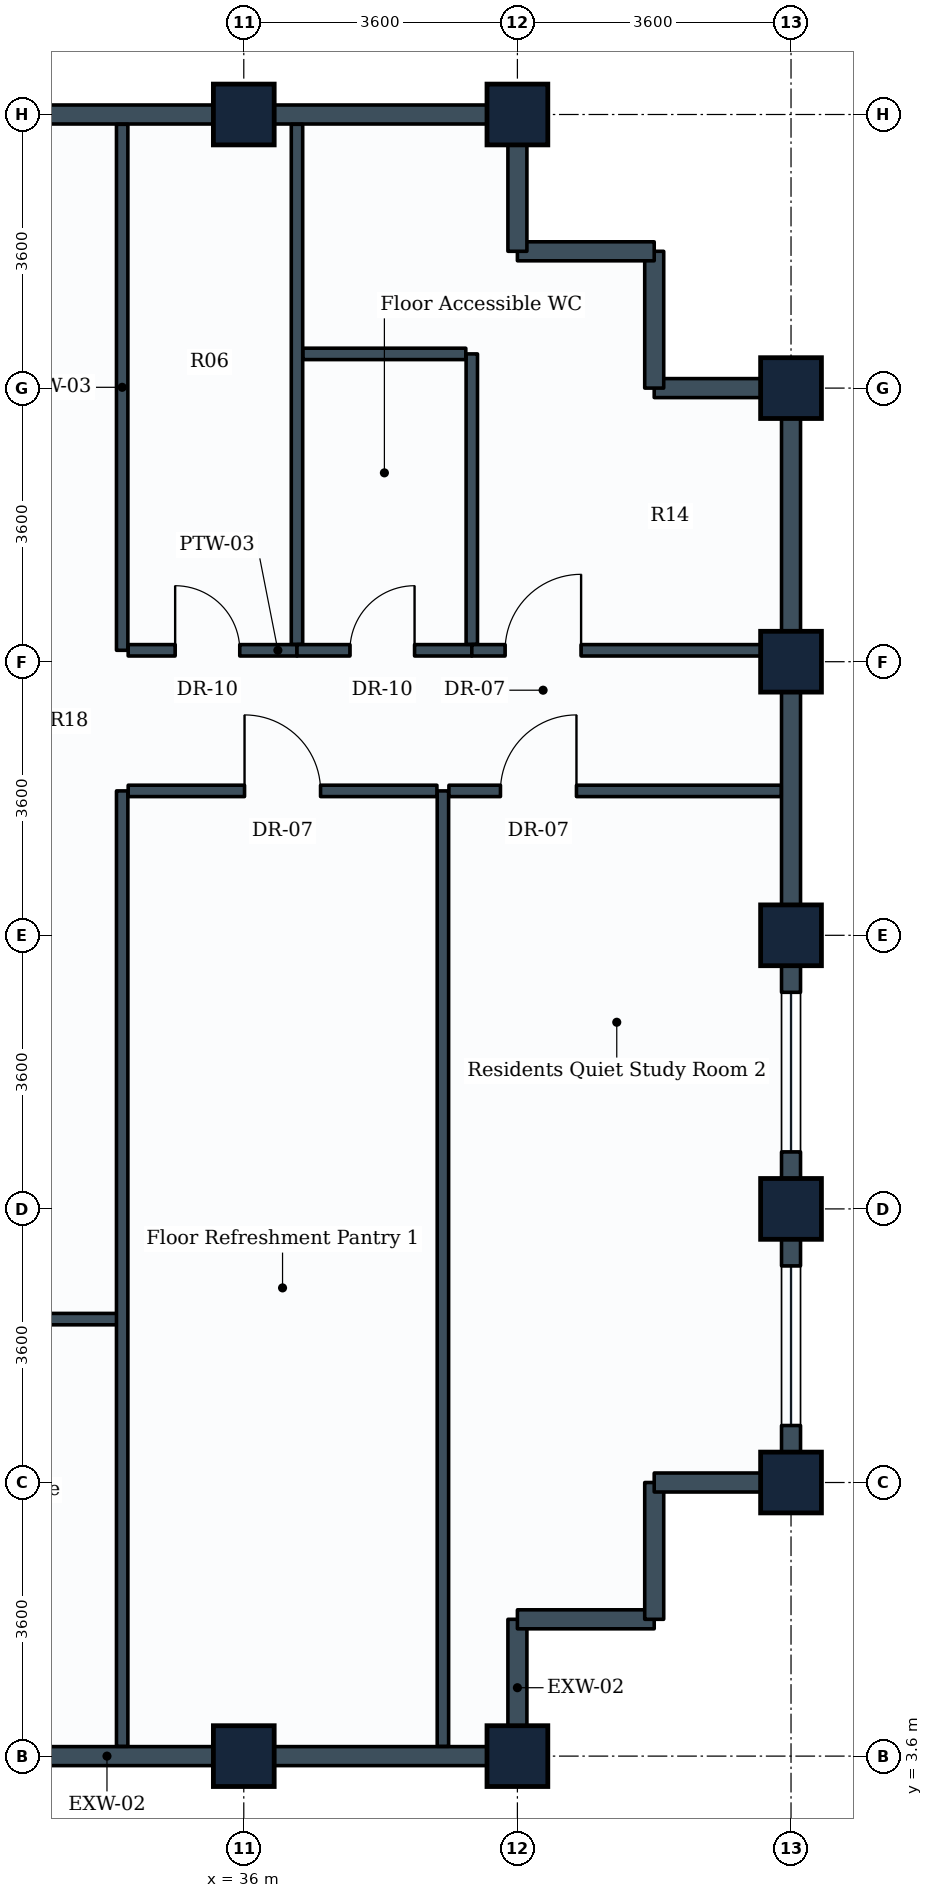
"""IFC4 building model, lengths in metres.
Left out: names, types, materials, properties, quantities, classifications, styles, units other than length and angle.
Written with IfcOpenShell. Run it as: python <this file> out.ifc"""

import sys

from ifc_helpers import new_model, si_unit, direction, frame, frame_2d, origin, origin_2d, place, context, subcontext, project, spatial, rectangle, extrude, element, fill, save


model = new_model("IFC4")
c1 = context("Model", 3, precision=1e-05, world=origin(), true_north=direction((0.0, 1.0)))
c2 = subcontext(c1, "Body", "Model", "MODEL_VIEW")
j1 = project(units=[si_unit("LENGTHUNIT", "METRE"), si_unit("PLANEANGLEUNIT", "RADIAN")], contexts=[c1])
p1 = place(None, origin())
s1 = spatial("IfcSite", under=j1, at=p1, CompositionType="ELEMENT")
p2 = place(p1, origin())
s2 = spatial("IfcBuilding", under=s1, at=p2, CompositionType="ELEMENT")
p3 = place(p2, frame((0.0, 0.0, 263.0)))
s3 = spatial("IfcBuildingStorey", under=s2, at=p3, CompositionType="ELEMENT", Elevation=263.0)
for number, where, z_axis, x_axis in (
    (1, (36.0, 3.6, 0.0), (0.0, 0.0, 1.0), (1.0, 0.0, 0.0)),
    (2, (36.0, 25.2, 0.0), (0.0, 0.0, 1.0), (1.0, 0.0, 0.0)),
    (3, (39.6, 3.6, 0.0), (0.0, 0.0, 1.0), (1.0, 0.0, 0.0)),
    (4, (39.6, 25.2, 0.0), (0.0, 0.0, 1.0), (1.0, 0.0, 0.0)),
    (5, (43.2, 7.2, 0.0), (0.0, 0.0, 1.0), (1.0, 0.0, 0.0)),
    (6, (43.2, 10.8, 0.0), (0.0, 0.0, 1.0), (0.0, 1.0, 0.0)),
    (7, (43.2, 14.4, 0.0), (0.0, 0.0, 1.0), (0.0, 1.0, 0.0)),
    (8, (43.2, 18.0, 0.0), (0.0, 0.0, 1.0), (0.0, 1.0, 0.0)),
    (9, (43.2, 21.6, 0.0), (0.0, 0.0, 1.0), (0.0, 1.0, 0.0)),
):
    element("IfcColumn", number, at=place(p3, frame(where, z_axis=z_axis, x_axis=x_axis)), inside=s3, PredefinedType="COLUMN", context=c2, shape_type="SweptSolid", body=[
        extrude(rectangle(XDim=0.8, YDim=0.8, at=origin_2d()), origin(), (0.0, 0.0, 1.0), 3.6),
    ])
for number, where, z_axis, x_axis in (
    (10, (36.0, 3.6, 0.0), (0.0, 0.0, 1.0), (-1.0, 0.0, 0.0)),
    (11, (39.6, 3.6, 0.0), (0.0, 0.0, 1.0), (-1.0, 0.0, 0.0)),
):
    element("IfcWall", number, at=place(p3, frame(where, z_axis=z_axis, x_axis=x_axis)), inside=s3, PredefinedType="STANDARD", context=c2, shape_type="SweptSolid", body=[
        extrude(rectangle(XDim=3.6, YDim=0.25, at=frame_2d((1.8, 0.0))), origin(), (0.0, 0.0, 1.0), 2.83),
    ])
p4 = place(p3, frame((39.6, 5.4, 0.0), z_axis=(0.0, 0.0, 1.0), x_axis=(0.0, -1.0, 0.0)))
e12 = element("IfcWall", 12, at=p4, inside=s3, PredefinedType="STANDARD", context=c2, shape_type="SweptSolid", body=[
    extrude(rectangle(XDim=1.8, YDim=0.25, at=frame_2d((0.9, 0.0))), origin(), (0.0, 0.0, 1.0), 2.83),
])
p5 = place(p3, frame((41.4, 5.4, 0.0), z_axis=(0.0, 0.0, 1.0), x_axis=(-1.0, 0.0, 0.0)))
e13 = element("IfcWall", 13, at=p5, inside=s3, PredefinedType="STANDARD", context=c2, shape_type="SweptSolid", body=[
    extrude(rectangle(XDim=1.8, YDim=0.25, at=frame_2d((0.9, 0.0))), origin(), (0.0, 0.0, 1.0), 3.335),
])
p6 = place(p3, frame((41.4, 7.2, 0.0), z_axis=(0.0, 0.0, 1.0), x_axis=(0.0, -1.0, 0.0)))
e14 = element("IfcWall", 14, at=p6, inside=s3, PredefinedType="STANDARD", context=c2, shape_type="SweptSolid", body=[
    extrude(rectangle(XDim=1.8, YDim=0.25, at=frame_2d((0.9, 0.0))), origin(), (0.0, 0.0, 1.0), 3.335),
])
p7 = place(p3, frame((43.2, 7.2, 0.0), z_axis=(0.0, 0.0, 1.0), x_axis=(-1.0, 0.0, 0.0)))
e15 = element("IfcWall", 15, at=p7, inside=s3, PredefinedType="STANDARD", context=c2, shape_type="SweptSolid", body=[
    extrude(rectangle(XDim=1.8, YDim=0.25, at=frame_2d((0.9, 0.0))), origin(), (0.0, 0.0, 1.0), 2.83),
])
p8 = place(p3, frame((43.2, 10.8, 0.0), z_axis=(0.0, 0.0, 1.0), x_axis=(0.0, -1.0, 0.0)))
e16 = element("IfcWall", 16, at=p8, inside=s3, PredefinedType="STANDARD", context=c2, shape_type="SweptSolid", body=[
    extrude(rectangle(XDim=3.6, YDim=0.25, at=frame_2d((1.8, 0.0))), origin(), (0.0, 0.0, 1.0), 2.83),
])
p9 = place(p8, frame((0.75, 0.0, 0.85)))
e17 = element("IfcOpeningElement", 17, at=p9, cuts=e16, PredefinedType="OPENING", context=c2, shape_type="SweptSolid", body=[
    extrude(rectangle(XDim=2.1, YDim=1.35, at=frame_2d((1.05, 0.675))), frame((0.0, 0.135, 0.0), z_axis=(0.0, -1.0, 0.0), x_axis=(1.0, 0.0, 0.0)), (0.0, 0.0, 1.0), 0.27),
])
p10 = place(p3, frame((43.2, 14.4, 0.0), z_axis=(0.0, 0.0, 1.0), x_axis=(0.0, -1.0, 0.0)))
e18 = element("IfcWall", 18, at=p10, inside=s3, PredefinedType="STANDARD", context=c2, shape_type="SweptSolid", body=[
    extrude(rectangle(XDim=3.6, YDim=0.25, at=frame_2d((1.8, 0.0))), origin(), (0.0, 0.0, 1.0), 2.83),
])
p11 = place(p10, frame((0.75, 0.0, 0.85)))
e19 = element("IfcOpeningElement", 19, at=p11, cuts=e18, PredefinedType="OPENING", context=c2, shape_type="SweptSolid", body=[
    extrude(rectangle(XDim=2.1, YDim=1.35, at=frame_2d((1.05, 0.675))), frame((0.0, 0.135, 0.0), z_axis=(0.0, -1.0, 0.0), x_axis=(1.0, 0.0, 0.0)), (0.0, 0.0, 1.0), 0.27),
])
for number, where, z_axis, x_axis in (
    (20, (43.2, 18.0, 0.0), (0.0, 0.0, 1.0), (0.0, -1.0, 0.0)),
    (21, (43.2, 21.6, 0.0), (0.0, 0.0, 1.0), (0.0, -1.0, 0.0)),
):
    element("IfcWall", number, at=place(p3, frame(where, z_axis=z_axis, x_axis=x_axis)), inside=s3, PredefinedType="STANDARD", context=c2, shape_type="SweptSolid", body=[
        extrude(rectangle(XDim=3.6, YDim=0.25, at=frame_2d((1.8, 0.0))), origin(), (0.0, 0.0, 1.0), 2.83),
    ])
p12 = place(p3, frame((41.4, 21.6, 0.0), z_axis=(0.0, 0.0, 1.0), x_axis=(1.0, 0.0, 0.0)))
e22 = element("IfcWall", 22, at=p12, inside=s3, PredefinedType="STANDARD", context=c2, shape_type="SweptSolid", body=[
    extrude(rectangle(XDim=1.8, YDim=0.25, at=frame_2d((0.9, 0.0))), origin(), (0.0, 0.0, 1.0), 2.83),
])
for number, where, z_axis, x_axis in (
    (23, (41.4, 23.4, 0.0), (0.0, 0.0, 1.0), (0.0, -1.0, 0.0)),
    (24, (39.6, 23.4, 0.0), (0.0, 0.0, 1.0), (1.0, 0.0, 0.0)),
):
    element("IfcWall", number, at=place(p3, frame(where, z_axis=z_axis, x_axis=x_axis)), inside=s3, PredefinedType="STANDARD", context=c2, shape_type="SweptSolid", body=[
        extrude(rectangle(XDim=1.8, YDim=0.25, at=frame_2d((0.9, 0.0))), origin(), (0.0, 0.0, 1.0), 3.335),
    ])
p13 = place(p3, frame((39.6, 25.2, 0.0), z_axis=(0.0, 0.0, 1.0), x_axis=(0.0, -1.0, 0.0)))
e25 = element("IfcWall", 25, at=p13, inside=s3, PredefinedType="STANDARD", context=c2, shape_type="SweptSolid", body=[
    extrude(rectangle(XDim=1.8, YDim=0.25, at=frame_2d((0.9, 0.0))), origin(), (0.0, 0.0, 1.0), 2.83),
])
for number, where, z_axis, x_axis in (
    (26, (36.0, 25.2, 0.0), (0.0, 0.0, 1.0), (1.0, 0.0, 0.0)),
    (27, (32.4, 25.2, 0.0), (0.0, 0.0, 1.0), (1.0, 0.0, 0.0)),
):
    element("IfcWall", number, at=place(p3, frame(where, z_axis=z_axis, x_axis=x_axis)), inside=s3, PredefinedType="STANDARD", context=c2, shape_type="SweptSolid", body=[
        extrude(rectangle(XDim=3.6, YDim=0.25, at=frame_2d((1.8, 0.0))), origin(), (0.0, 0.0, 1.0), 2.83),
    ])
p14 = place(p3, frame((34.4, 18.15, 0.0), z_axis=(0.0, 0.0, 1.0), x_axis=(0.0, 1.0, 0.0)))
e28 = element("IfcWall", 28, at=p14, inside=s3, PredefinedType="PARTITIONING", context=c2, shape_type="SweptSolid", body=[
    extrude(rectangle(XDim=6.921, YDim=0.15, at=frame_2d((3.46, 0.0))), origin(), (0.0, 0.0, 1.0), 2.83),
])
p15 = place(p3, frame((34.479, 18.15, 0.0), z_axis=(0.0, 0.0, 1.0), x_axis=(1.0, 0.0, 0.0)))
e29 = element("IfcWall", 29, at=p15, inside=s3, PredefinedType="PARTITIONING", context=c2, shape_type="SweptSolid", body=[
    extrude(rectangle(XDim=2.221, YDim=0.15, at=frame_2d((1.11, 0.0))), origin(), (0.0, 0.0, 1.0), 3.02),
])
p16 = place(p15, frame((0.618, 0.0, 0.0)))
e30 = element("IfcOpeningElement", 30, at=p16, cuts=e29, PredefinedType="OPENING", context=c2, shape_type="SweptSolid", body=[
    extrude(rectangle(XDim=0.85, YDim=2.1, at=frame_2d((0.425, 1.05))), frame((0.0, 0.085, 0.0), z_axis=(0.0, -1.0, 0.0), x_axis=(1.0, 0.0, 0.0)), (0.0, 0.0, 1.0), 0.17),
])
p17 = place(p3, frame((36.7, 18.229, 0.0), z_axis=(0.0, 0.0, 1.0), x_axis=(0.0, 1.0, 0.0)))
e31 = element("IfcWall", 31, at=p17, inside=s3, PredefinedType="PARTITIONING", context=c2, shape_type="SweptSolid", body=[
    extrude(rectangle(XDim=6.842, YDim=0.15, at=frame_2d((3.421, 0.0))), origin(), (0.0, 0.0, 1.0), 2.83),
])
p18 = place(p3, frame((36.7, 18.15, 0.0), z_axis=(0.0, 0.0, 1.0), x_axis=(1.0, 0.0, 0.0)))
e32 = element("IfcWall", 32, at=p18, inside=s3, PredefinedType="PARTITIONING", context=c2, shape_type="SweptSolid", body=[
    extrude(rectangle(XDim=2.3, YDim=0.15, at=frame_2d((1.15, 0.0))), origin(), (0.0, 0.0, 1.0), 3.335),
])
p19 = place(p18, frame((0.697, 0.0, 0.0)))
e33 = element("IfcOpeningElement", 33, at=p19, cuts=e32, PredefinedType="OPENING", context=c2, shape_type="SweptSolid", body=[
    extrude(rectangle(XDim=0.85, YDim=2.1, at=frame_2d((0.425, 1.05))), frame((0.0, 0.085, 0.0), z_axis=(0.0, -1.0, 0.0), x_axis=(1.0, 0.0, 0.0)), (0.0, 0.0, 1.0), 0.17),
])
p20 = place(p3, frame((39.0, 18.229, 0.0), z_axis=(0.0, 0.0, 1.0), x_axis=(0.0, 1.0, 0.0)))
e34 = element("IfcWall", 34, at=p20, inside=s3, PredefinedType="PARTITIONING", context=c2, shape_type="SweptSolid", body=[
    extrude(rectangle(XDim=3.821, YDim=0.15, at=frame_2d((1.911, 0.0))), origin(), (0.0, 0.0, 1.0), 3.335),
])
p21 = place(p3, frame((36.779, 22.05, 0.0), z_axis=(0.0, 0.0, 1.0), x_axis=(1.0, 0.0, 0.0)))
e35 = element("IfcWall", 35, at=p21, inside=s3, PredefinedType="PARTITIONING", context=c2, shape_type="SweptSolid", body=[
    extrude(rectangle(XDim=2.142, YDim=0.15, at=frame_2d((1.071, 0.0))), origin(), (0.0, 0.0, 1.0), 3.335),
])
p22 = place(p3, frame((28.879, 9.35, 0.0), z_axis=(0.0, 0.0, 1.0), x_axis=(1.0, 0.0, 0.0)))
e36 = element("IfcWall", 36, at=p22, inside=s3, PredefinedType="PARTITIONING", context=c2, shape_type="SweptSolid", body=[
    extrude(rectangle(XDim=5.521, YDim=0.15, at=frame_2d((2.76, 0.0))), origin(), (0.0, 0.0, 1.0), 3.335),
])
p23 = place(p22, frame((0.36, 0.0, 0.0)))
e37 = element("IfcOpeningElement", 37, at=p23, cuts=e36, PredefinedType="OPENING", context=c2, shape_type="SweptSolid", body=[
    extrude(rectangle(XDim=1.0, YDim=2.1, at=frame_2d((0.5, 1.05))), frame((0.0, 0.085, 0.0), z_axis=(0.0, -1.0, 0.0), x_axis=(1.0, 0.0, 0.0)), (0.0, 0.0, 1.0), 0.17),
])
for number, where, z_axis, x_axis in (
    (38, (34.4, 3.729, 0.0), (0.0, 0.0, 1.0), (0.0, 1.0, 0.0)),
    (39, (38.62, 3.729, 0.0), (0.0, 0.0, 1.0), (0.0, 1.0, 0.0)),
):
    element("IfcWall", number, at=place(p3, frame(where, z_axis=z_axis, x_axis=x_axis)), inside=s3, PredefinedType="PARTITIONING", context=c2, shape_type="SweptSolid", body=[
        extrude(rectangle(XDim=12.571, YDim=0.15, at=frame_2d((6.286, 0.0))), origin(), (0.0, 0.0, 1.0), 2.83),
    ])
p24 = place(p3, frame((34.479, 16.3, 0.0), z_axis=(0.0, 0.0, 1.0), x_axis=(1.0, 0.0, 0.0)))
e40 = element("IfcWall", 40, at=p24, inside=s3, PredefinedType="PARTITIONING", context=c2, shape_type="SweptSolid", body=[
    extrude(rectangle(XDim=4.062, YDim=0.15, at=frame_2d((2.031, 0.0))), origin(), (0.0, 0.0, 1.0), 3.02),
])
p25 = place(p24, frame((1.531, 0.0, 0.0)))
e41 = element("IfcOpeningElement", 41, at=p25, cuts=e40, PredefinedType="OPENING", context=c2, shape_type="SweptSolid", body=[
    extrude(rectangle(XDim=1.0, YDim=2.1, at=frame_2d((0.5, 1.05))), frame((0.0, 0.085, 0.0), z_axis=(0.0, -1.0, 0.0), x_axis=(1.0, 0.0, 0.0)), (0.0, 0.0, 1.0), 0.17),
])
p26 = place(p3, frame((38.699, 16.3, 0.0), z_axis=(0.0, 0.0, 1.0), x_axis=(1.0, 0.0, 0.0)))
e42 = element("IfcWall", 42, at=p26, inside=s3, PredefinedType="PARTITIONING", context=c2, shape_type="SweptSolid", body=[
    extrude(rectangle(XDim=4.372, YDim=0.15, at=frame_2d((2.186, 0.0))), origin(), (0.0, 0.0, 1.0), 2.83),
])
p27 = place(p26, frame((0.678, 0.0, 0.0)))
e43 = element("IfcOpeningElement", 43, at=p27, cuts=e42, PredefinedType="OPENING", context=c2, shape_type="SweptSolid", body=[
    extrude(rectangle(XDim=1.0, YDim=2.1, at=frame_2d((0.5, 1.05))), frame((0.0, 0.085, 0.0), z_axis=(0.0, -1.0, 0.0), x_axis=(1.0, 0.0, 0.0)), (0.0, 0.0, 1.0), 0.17),
])
p28 = place(p3, frame((39.0, 18.15, 0.0), z_axis=(0.0, 0.0, 1.0), x_axis=(1.0, 0.0, 0.0)))
e44 = element("IfcWall", 44, at=p28, inside=s3, PredefinedType="PARTITIONING", context=c2, shape_type="SweptSolid", body=[
    extrude(rectangle(XDim=4.071, YDim=0.15, at=frame_2d((2.036, 0.0))), origin(), (0.0, 0.0, 1.0), 2.83),
])
p29 = place(p28, frame((0.438, 0.0, 0.0)))
e45 = element("IfcOpeningElement", 45, at=p29, cuts=e44, PredefinedType="OPENING", context=c2, shape_type="SweptSolid", body=[
    extrude(rectangle(XDim=1.0, YDim=2.1, at=frame_2d((0.5, 1.05))), frame((0.0, 0.085, 0.0), z_axis=(0.0, -1.0, 0.0), x_axis=(1.0, 0.0, 0.0)), (0.0, 0.0, 1.0), 0.17),
])
p30 = place(p9, origin())
e46 = element("IfcWindow", 46, at=p30, inside=s3, PartitioningType="SINGLE_PANEL", PredefinedType="WINDOW", context=c2, shape_type="SweptSolid", body=[
    extrude(rectangle(XDim=2.1, YDim=1.35, at=frame_2d((1.05, 0.675))), frame((0.0, 0.03, 0.0), z_axis=(0.0, -1.0, 0.0), x_axis=(1.0, 0.0, 0.0)), (0.0, 0.0, 1.0), 0.06),
])
fill(e17, e46)
p31 = place(p11, origin())
e47 = element("IfcWindow", 47, at=p31, inside=s3, PartitioningType="SINGLE_PANEL", PredefinedType="WINDOW", context=c2, shape_type="SweptSolid", body=[
    extrude(rectangle(XDim=2.1, YDim=1.35, at=frame_2d((1.05, 0.675))), frame((0.0, 0.03, 0.0), z_axis=(0.0, -1.0, 0.0), x_axis=(1.0, 0.0, 0.0)), (0.0, 0.0, 1.0), 0.06),
])
fill(e19, e47)
p32 = place(p16, origin())
e48 = element("IfcDoor", 48, at=p32, inside=s3, OperationType="SINGLE_SWING_LEFT", PredefinedType="DOOR", context=c2, shape_type="SweptSolid", body=[
    extrude(rectangle(XDim=0.85, YDim=2.1, at=frame_2d((0.425, 1.05))), frame((0.0, 0.025, 0.0), z_axis=(0.0, -1.0, 0.0), x_axis=(1.0, 0.0, 0.0)), (0.0, 0.0, 1.0), 0.05),
])
fill(e30, e48)
p33 = place(p19, origin())
e49 = element("IfcDoor", 49, at=p33, inside=s3, OperationType="SINGLE_SWING_RIGHT", PredefinedType="DOOR", context=c2, shape_type="SweptSolid", body=[
    extrude(rectangle(XDim=0.85, YDim=2.1, at=frame_2d((0.425, 1.05))), frame((0.0, 0.025, 0.0), z_axis=(0.0, -1.0, 0.0), x_axis=(1.0, 0.0, 0.0)), (0.0, 0.0, 1.0), 0.05),
])
fill(e33, e49)
p34 = place(p25, origin())
e50 = element("IfcDoor", 50, at=p34, inside=s3, OperationType="SINGLE_SWING_LEFT", PredefinedType="DOOR", context=c2, shape_type="SweptSolid", body=[
    extrude(rectangle(XDim=1.0, YDim=2.1, at=frame_2d((0.5, 1.05))), frame((0.0, 0.025, 0.0), z_axis=(0.0, -1.0, 0.0), x_axis=(1.0, 0.0, 0.0)), (0.0, 0.0, 1.0), 0.05),
])
fill(e41, e50)
p35 = place(p27, origin())
e51 = element("IfcDoor", 51, at=p35, inside=s3, OperationType="SINGLE_SWING_RIGHT", PredefinedType="DOOR", context=c2, shape_type="SweptSolid", body=[
    extrude(rectangle(XDim=1.0, YDim=2.1, at=frame_2d((0.5, 1.05))), frame((0.0, 0.025, 0.0), z_axis=(0.0, -1.0, 0.0), x_axis=(1.0, 0.0, 0.0)), (0.0, 0.0, 1.0), 0.05),
])
fill(e43, e51)
p36 = place(p29, origin())
e52 = element("IfcDoor", 52, at=p36, inside=s3, OperationType="SINGLE_SWING_RIGHT", PredefinedType="DOOR", context=c2, shape_type="SweptSolid", body=[
    extrude(rectangle(XDim=1.0, YDim=2.1, at=frame_2d((0.5, 1.05))), frame((0.0, 0.025, 0.0), z_axis=(0.0, -1.0, 0.0), x_axis=(1.0, 0.0, 0.0)), (0.0, 0.0, 1.0), 0.05),
])
fill(e45, e52)
save(model, sys.argv[1])
